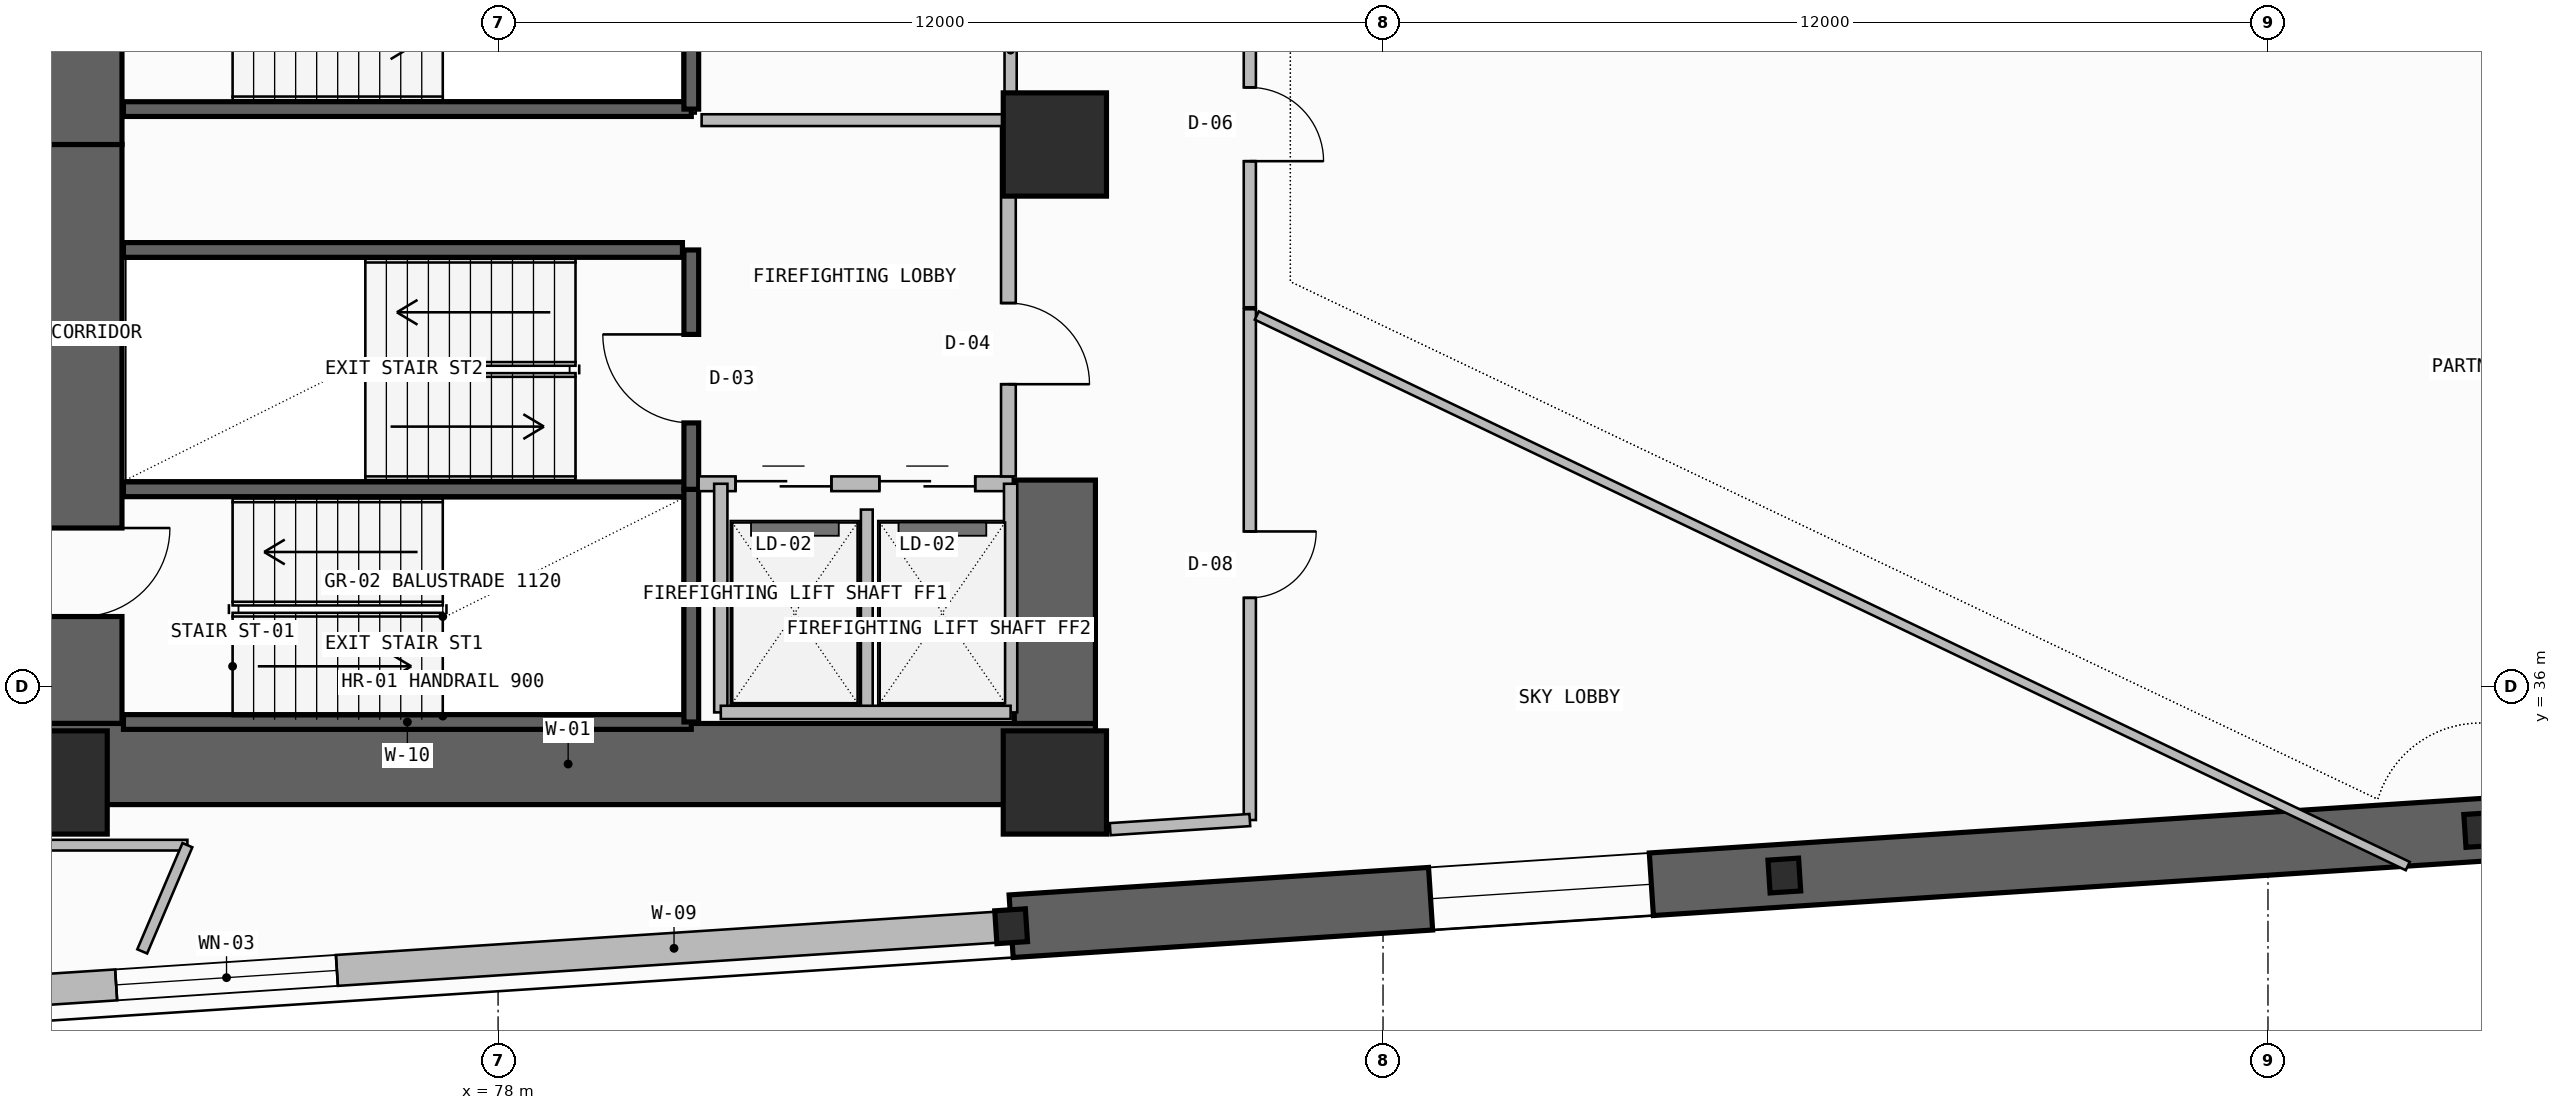
"""IFC4 building model, lengths in metres.
Left out: names, types, materials, properties, quantities, classifications, styles, units other than length and angle.
Written with IfcOpenShell. Run it as: python <this file> out.ifc"""

import sys

from ifc_helpers import new_model, si_unit, direction, frame, frame_2d, origin, origin_2d, place, context, subcontext, project, spatial, rectangle, i_section, extrude, element, fill, save


model = new_model("IFC4")
c1 = context("Model", 3, precision=1e-05, world=origin(), true_north=direction((0.0, 1.0)))
c2 = subcontext(c1, "Body", "Model", "MODEL_VIEW")
j1 = project(units=[si_unit("LENGTHUNIT", "METRE"), si_unit("PLANEANGLEUNIT", "RADIAN")], contexts=[c1])
p1 = place(None, origin())
s1 = spatial("IfcSite", under=j1, at=p1, CompositionType="ELEMENT")
p2 = place(p1, origin())
s2 = spatial("IfcBuilding", under=s1, at=p2, CompositionType="ELEMENT")
p3 = place(p2, frame((0.0, 0.0, 92.1)))
s3 = spatial("IfcBuildingStorey", under=s2, at=p3, CompositionType="ELEMENT", Elevation=92.1)
p4 = place(p3, frame((72.35, 35.5, -0.26), z_axis=(0.0, 0.0, 1.0), x_axis=(0.0, 1.0, 0.0)))
e1 = element("IfcWall", 1, at=p4, inside=s3, PredefinedType="SHEAR", context=c2, shape_type="SweptSolid", body=[
    extrude(rectangle(XDim=7.85, YDim=1.1, at=frame_2d((3.925, 0.0))), origin(), (0.0, 0.0, 1.0), 3.46),
])
p5 = place(p4, frame((1.45, 0.0, 0.26)))
e2 = element("IfcOpeningElement", 2, at=p5, cuts=e1, PredefinedType="OPENING", context=c2, shape_type="SweptSolid", body=[
    extrude(rectangle(XDim=1.2, YDim=2.2, at=frame_2d((0.6, 1.1))), frame((0.0, 0.56, 0.0), z_axis=(0.0, -1.0, 0.0), x_axis=(1.0, 0.0, 0.0)), (0.0, 0.0, 1.0), 1.12),
])
p6 = place(p3, frame((71.8, 34.95, -0.26), z_axis=(0.0, 0.0, 1.0), x_axis=(1.0, 0.0, 0.0)))
e3 = element("IfcWall", 3, at=p6, inside=s3, PredefinedType="SHEAR", context=c2, shape_type="SweptSolid", body=[
    extrude(rectangle(XDim=14.3, YDim=1.1, at=frame_2d((7.15, 0.0))), origin(), (0.0, 0.0, 1.0), 3.46),
])
p7 = place(p3, frame((85.55, 35.5, -0.26), z_axis=(0.0, 0.0, 1.0), x_axis=(0.0, 1.0, 0.0)))
e4 = element("IfcWall", 4, at=p7, inside=s3, PredefinedType="SHEAR", context=c2, shape_type="SweptSolid", body=[
    extrude(rectangle(XDim=3.3, YDim=1.1, at=frame_2d((1.65, 0.0))), origin(), (0.0, 0.0, 1.0), 3.46),
])
p8 = place(p3, frame((72.35, 43.35, -0.26), z_axis=(0.0, 0.0, 1.0), x_axis=(0.0, 1.0, 0.0)))
e5 = element("IfcWall", 5, at=p8, inside=s3, PredefinedType="SHEAR", context=c2, shape_type="SweptSolid", body=[
    extrude(rectangle(XDim=12.7, YDim=1.1, at=frame_2d((6.35, 0.0))), origin(), (0.0, 0.0, 1.0), 3.46),
])
p9 = place(p8, frame((1.35, 0.0, 0.26)))
e6 = element("IfcOpeningElement", 6, at=p9, cuts=e5, PredefinedType="OPENING", context=c2, shape_type="SweptSolid", body=[
    extrude(rectangle(XDim=1.2, YDim=2.2, at=frame_2d((0.6, 1.1))), frame((0.0, 0.56, 0.0), z_axis=(0.0, -1.0, 0.0), x_axis=(1.0, 0.0, 0.0)), (0.0, 0.0, 1.0), 1.12),
])
for number, where, z_axis, x_axis in (
    (7, (72.0, 34.7, 0.0), (0.0, 0.0, 1.0), (1.0, 0.0, 0.0)),
    (8, (85.55, 34.7, 0.0), (0.0, 0.0, 1.0), (1.0, 0.0, 0.0)),
    (9, (85.55, 43.35, 0.0), (0.0, 0.0, 1.0), (1.0, 0.0, 0.0)),
):
    element("IfcColumn", number, at=place(p3, frame(where, z_axis=z_axis, x_axis=x_axis)), inside=s3, PredefinedType="COLUMN", context=c2, shape_type="SweptSolid", body=[
        extrude(rectangle(XDim=1.4, YDim=1.4, at=origin_2d()), origin(), (0.0, 0.0, 1.0), 3.6),
    ])
for number, where, z_axis, x_axis in (
    (10, (84.957, 32.751, 0.0), (0.0, 0.0, 1.0), (0.998, 0.065, 0.0)),
    (11, (95.442, 33.438, 0.0), (0.0, 0.0, 1.0), (0.998, 0.065, 0.0)),
    (12, (104.878, 34.057, 0.0), (0.0, 0.0, 1.0), (0.998, 0.065, 0.0)),
):
    element("IfcColumn", number, at=place(p3, frame(where, z_axis=z_axis, x_axis=x_axis)), inside=s3, PredefinedType="COLUMN", context=c2, shape_type="SweptSolid", body=[
        extrude(i_section(OverallWidth=0.416, OverallDepth=0.446, WebThickness=0.039, FlangeThickness=0.063, FilletRadius=0.015, at=origin_2d()), origin(), (0.0, 0.0, 1.0), 3.6),
    ])
p10 = place(p3, frame((67.133, 31.583, 0.0), z_axis=(0.0, 0.0, 1.0), x_axis=(0.997859040617, 0.065401338356, 0.0)))
e13 = element("IfcWall", 13, at=p10, inside=s3, PredefinedType="SOLIDWALL", context=c2, shape_type="SweptSolid", body=[
    extrude(rectangle(XDim=17.862, YDim=0.42, at=frame_2d((8.931, 0.0))), origin(), (0.0, 0.0, 1.0), 2.177),
])
p11 = place(p10, frame((5.7, 0.0, 1.197)))
e14 = element("IfcOpeningElement", 14, at=p11, cuts=e13, PredefinedType="OPENING", context=c2, shape_type="SweptSolid", body=[
    extrude(rectangle(XDim=3.0, YDim=0.9, at=frame_2d((1.5, 0.45))), frame((0.0, 0.22, 0.0), z_axis=(0.0, -1.0, 0.0), x_axis=(1.0, 0.0, 0.0)), (0.0, 0.0, 1.0), 0.44),
])
p12 = place(p3, frame((84.957, 32.751, -0.26), z_axis=(0.0, 0.0, 1.0), x_axis=(0.997859046449, 0.065401249368, 0.0)))
e15 = element("IfcWall", 15, at=p12, inside=s3, PredefinedType="SHEAR", context=c2, shape_type="SweptSolid", body=[
    extrude(rectangle(XDim=28.4, YDim=0.85, at=frame_2d((14.2, 0.0))), origin(), (0.0, 0.0, 1.0), 3.46),
])
p13 = place(p12, frame((5.7, 0.0, 1.2)))
e16 = element("IfcOpeningElement", 16, at=p13, cuts=e15, PredefinedType="OPENING", context=c2, shape_type="SweptSolid", body=[
    extrude(rectangle(XDim=3.0, YDim=0.9, at=frame_2d((1.5, 0.45))), frame((0.0, 0.435, 0.0), z_axis=(0.0, -1.0, 0.0), x_axis=(1.0, 0.0, 0.0)), (0.0, 0.0, 1.0), 0.87),
])
p14 = place(p3, frame((121.476, 37.781, 0.0), z_axis=(0.0, 0.0, 1.0), x_axis=(-0.787385636484, 0.61646075257, 0.0)))
e17 = element("IfcWall", 17, at=p14, inside=s3, PredefinedType="PARAPET", context=c2, shape_type="SweptSolid", body=[
    extrude(rectangle(XDim=35.957, YDim=0.2, at=frame_2d((17.979, 0.0))), origin(), (0.0, 0.0, 1.0), 1.15),
])
for number, where, z_axis, x_axis in (
    (18, (72.92, 35.52, -0.26), (0.0, 0.0, 1.0), (1.0, 0.0, 0.0)),
    (19, (72.92, 38.675, -0.26), (0.0, 0.0, 1.0), (1.0, 0.0, 0.0)),
):
    element("IfcWall", number, at=place(p3, frame(where, z_axis=z_axis, x_axis=x_axis)), inside=s3, PredefinedType="SOLIDWALL", context=c2, shape_type="SweptSolid", body=[
        extrude(rectangle(XDim=7.7, YDim=0.2, at=frame_2d((3.85, 0.0))), origin(), (0.0, 0.0, 1.0), 3.46),
    ])
p15 = place(p3, frame((80.62, 35.52, -0.26), z_axis=(0.0, 0.0, 1.0), x_axis=(0.0, 1.0, 0.0)))
e20 = element("IfcWall", 20, at=p15, inside=s3, PredefinedType="SOLIDWALL", context=c2, shape_type="SweptSolid", body=[
    extrude(rectangle(XDim=3.155, YDim=0.2, at=frame_2d((1.578, 0.0))), origin(), (0.0, 0.0, 1.0), 3.46),
])
p16 = place(p3, frame((80.62, 38.675, -0.26), z_axis=(0.0, 0.0, 1.0), x_axis=(0.0, 1.0, 0.0)))
e21 = element("IfcWall", 21, at=p16, inside=s3, PredefinedType="SOLIDWALL", context=c2, shape_type="SweptSolid", body=[
    extrude(rectangle(XDim=3.245, YDim=0.2, at=frame_2d((1.623, 0.0))), origin(), (0.0, 0.0, 1.0), 3.46),
])
p17 = place(p16, frame((0.9, 0.0, 0.26)))
e22 = element("IfcOpeningElement", 22, at=p17, cuts=e21, PredefinedType="OPENING", context=c2, shape_type="SweptSolid", body=[
    extrude(rectangle(XDim=1.2, YDim=2.2, at=frame_2d((0.6, 1.1))), frame((0.0, 0.11, 0.0), z_axis=(0.0, -1.0, 0.0), x_axis=(1.0, 0.0, 0.0)), (0.0, 0.0, 1.0), 0.22),
])
p18 = place(p3, frame((80.72, 38.75, 0.0), z_axis=(0.0, 0.0, 1.0), x_axis=(1.0, 0.0, 0.0)))
e23 = element("IfcWall", 23, at=p18, inside=s3, PredefinedType="SOLIDWALL", context=c2, shape_type="SweptSolid", body=[
    extrude(rectangle(XDim=4.26, YDim=0.2, at=frame_2d((2.13, 0.0))), origin(), (0.0, 0.0, 1.0), 3.2),
])
p19 = place(p18, frame((0.5, 0.0, 0.0)))
e24 = element("IfcOpeningElement", 24, at=p19, cuts=e23, PredefinedType="OPENING", context=c2, shape_type="SweptSolid", body=[
    extrude(rectangle(XDim=1.3, YDim=2.3, at=frame_2d((0.65, 1.15))), frame((0.0, 0.11, 0.0), z_axis=(0.0, -1.0, 0.0), x_axis=(1.0, 0.0, 0.0)), (0.0, 0.0, 1.0), 0.22),
])
p20 = place(p18, frame((2.45, 0.0, 0.0)))
e25 = element("IfcOpeningElement", 25, at=p20, cuts=e23, PredefinedType="OPENING", context=c2, shape_type="SweptSolid", body=[
    extrude(rectangle(XDim=1.3, YDim=2.3, at=frame_2d((0.65, 1.15))), frame((0.0, 0.11, 0.0), z_axis=(0.0, -1.0, 0.0), x_axis=(1.0, 0.0, 0.0)), (0.0, 0.0, 1.0), 0.22),
])
p21 = place(p3, frame((83.0, 35.65, 0.0), z_axis=(0.0, 0.0, 1.0), x_axis=(0.0, 1.0, 0.0)))
e26 = element("IfcWall", 26, at=p21, inside=s3, PredefinedType="PLUMBINGWALL", context=c2, shape_type="SweptSolid", body=[
    extrude(rectangle(XDim=2.75, YDim=0.16, at=frame_2d((1.375, 0.0))), origin(), (0.0, 0.0, 1.0), 3.2),
])
for number, where, z_axis, x_axis in (
    (27, (84.95, 35.65, 0.0), (0.0, 0.0, 1.0), (0.0, 1.0, 0.0)),
    (28, (81.02, 35.65, 0.0), (0.0, 0.0, 1.0), (0.0, 1.0, 0.0)),
):
    element("IfcWall", number, at=place(p3, frame(where, z_axis=z_axis, x_axis=x_axis)), inside=s3, PredefinedType="SOLIDWALL", context=c2, shape_type="SweptSolid", body=[
        extrude(rectangle(XDim=3.1, YDim=0.18, at=frame_2d((1.55, 0.0))), origin(), (0.0, 0.0, 1.0), 3.2),
    ])
p22 = place(p3, frame((81.02, 35.65, 0.0), z_axis=(0.0, 0.0, 1.0), x_axis=(1.0, 0.0, 0.0)))
e29 = element("IfcWall", 29, at=p22, inside=s3, PredefinedType="SOLIDWALL", context=c2, shape_type="SweptSolid", body=[
    extrude(rectangle(XDim=3.93, YDim=0.18, at=frame_2d((1.965, 0.0))), origin(), (0.0, 0.0, 1.0), 3.2),
])
p23 = place(p3, frame((84.92, 38.85, 0.0), z_axis=(0.0, 0.0, 1.0), x_axis=(0.0, 1.0, 0.0)))
e30 = element("IfcWall", 30, at=p23, inside=s3, PredefinedType="SOLIDWALL", context=c2, shape_type="SweptSolid", body=[
    extrude(rectangle(XDim=4.83, YDim=0.2, at=frame_2d((2.415, 0.0))), origin(), (0.0, 0.0, 1.0), 3.2),
])
p24 = place(p23, frame((1.25, 0.0, 0.0)))
e31 = element("IfcOpeningElement", 31, at=p24, cuts=e30, PredefinedType="OPENING", context=c2, shape_type="SweptSolid", body=[
    extrude(rectangle(XDim=1.1, YDim=2.2, at=frame_2d((0.55, 1.1))), frame((0.0, 0.11, 0.0), z_axis=(0.0, -1.0, 0.0), x_axis=(1.0, 0.0, 0.0)), (0.0, 0.0, 1.0), 0.22),
])
p25 = place(p3, frame((72.92, 41.92, -0.26), z_axis=(0.0, 0.0, 1.0), x_axis=(1.0, 0.0, 0.0)))
e32 = element("IfcWall", 32, at=p25, inside=s3, PredefinedType="SOLIDWALL", context=c2, shape_type="SweptSolid", body=[
    extrude(rectangle(XDim=7.58, YDim=0.2, at=frame_2d((3.79, 0.0))), origin(), (0.0, 0.0, 1.0), 3.46),
])
p26 = place(p3, frame((72.92, 43.83, -0.26), z_axis=(0.0, 0.0, 1.0), x_axis=(1.0, 0.0, 0.0)))
e33 = element("IfcWall", 33, at=p26, inside=s3, PredefinedType="SOLIDWALL", context=c2, shape_type="SweptSolid", body=[
    extrude(rectangle(XDim=7.7, YDim=0.2, at=frame_2d((3.85, 0.0))), origin(), (0.0, 0.0, 1.0), 3.46),
])
p27 = place(p3, frame((80.62, 43.83, -0.26), z_axis=(0.0, 0.0, 1.0), x_axis=(0.0, 1.0, 0.0)))
e34 = element("IfcWall", 34, at=p27, inside=s3, PredefinedType="SOLIDWALL", context=c2, shape_type="SweptSolid", body=[
    extrude(rectangle(XDim=3.24, YDim=0.2, at=frame_2d((1.62, 0.0))), origin(), (0.0, 0.0, 1.0), 3.46),
])
p28 = place(p3, frame((84.95, 43.68, 0.0), z_axis=(0.0, 0.0, 1.0), x_axis=(0.0, 1.0, 0.0)))
e35 = element("IfcWall", 35, at=p28, inside=s3, PredefinedType="PLUMBINGWALL", context=c2, shape_type="SweptSolid", body=[
    extrude(rectangle(XDim=1.9, YDim=0.165, at=frame_2d((0.95, 0.0))), origin(), (0.0, 0.0, 1.0), 3.2),
])
p29 = place(p3, frame((80.76, 43.68, 0.0), z_axis=(0.0, 0.0, 1.0), x_axis=(1.0, 0.0, 0.0)))
e36 = element("IfcWall", 36, at=p29, inside=s3, PredefinedType="PLUMBINGWALL", context=c2, shape_type="SweptSolid", body=[
    extrude(rectangle(XDim=4.19, YDim=0.16, at=frame_2d((2.095, 0.0))), origin(), (0.0, 0.0, 1.0), 3.2),
])
p30 = place(p3, frame((88.194, 34.191, 0.0), z_axis=(0.0, 0.0, 1.0), x_axis=(0.0, 1.0, 0.0)))
e37 = element("IfcWall", 37, at=p30, inside=s3, PredefinedType="PARTITIONING", context=c2, shape_type="SweptSolid", body=[
    extrude(rectangle(XDim=6.926, YDim=0.165, at=frame_2d((3.463, 0.0))), origin(), (0.0, 0.0, 1.0), 2.177),
])
p31 = place(p30, frame((3.013, 0.0, 0.0)))
e38 = element("IfcOpeningElement", 38, at=p31, cuts=e37, PredefinedType="OPENING", context=c2, shape_type="SweptSolid", body=[
    extrude(rectangle(XDim=0.9, YDim=2.1, at=frame_2d((0.45, 1.05))), frame((0.0, 0.093, 0.0), z_axis=(0.0, -1.0, 0.0), x_axis=(1.0, 0.0, 0.0)), (0.0, 0.0, 1.0), 0.185),
])
p32 = place(p3, frame((86.3, 34.067, 0.0), z_axis=(0.0, 0.0, 1.0), x_axis=(0.997861903793, 0.065357638877, 0.0)))
e39 = element("IfcWall", 39, at=p32, inside=s3, PredefinedType="PARTITIONING", context=c2, shape_type="SweptSolid", body=[
    extrude(rectangle(XDim=1.898, YDim=0.165, at=frame_2d((0.949, 0.0))), origin(), (0.0, 0.0, 1.0), 2.177),
])
p33 = place(p3, frame((88.288, 41.031, 0.0), z_axis=(0.0, 0.0, 1.0), x_axis=(0.90213016178, -0.431463985991, 0.0)))
e40 = element("IfcWall", 40, at=p33, inside=s3, PredefinedType="PARTITIONING", context=c2, shape_type="SweptSolid", body=[
    extrude(rectangle(XDim=17.301, YDim=0.125, at=frame_2d((8.65, 0.0))), origin(), (0.0, 0.0, 1.0), 2.177),
])
p34 = place(p3, frame((88.194, 41.143, 0.0), z_axis=(0.0, 0.0, 1.0), x_axis=(0.0, 1.0, 0.0)))
e41 = element("IfcWall", 41, at=p34, inside=s3, PredefinedType="PARTITIONING", context=c2, shape_type="SweptSolid", body=[
    extrude(rectangle(XDim=4.962, YDim=0.165, at=frame_2d((2.481, 0.0))), origin(), (0.0, 0.0, 1.0), 3.2),
])
p35 = place(p34, frame((1.981, 0.0, 0.0)))
e42 = element("IfcOpeningElement", 42, at=p35, cuts=e41, PredefinedType="OPENING", context=c2, shape_type="SweptSolid", body=[
    extrude(rectangle(XDim=1.0, YDim=2.2, at=frame_2d((0.5, 1.1))), frame((0.0, 0.093, 0.0), z_axis=(0.0, -1.0, 0.0), x_axis=(1.0, 0.0, 0.0)), (0.0, 0.0, 1.0), 0.185),
])
p36 = place(p3, frame((71.482, 33.85, 0.0), z_axis=(0.0, 0.0, 1.0), x_axis=(1.0, 0.0, 0.0)))
e43 = element("IfcWall", 43, at=p36, inside=s3, PredefinedType="PARTITIONING", context=c2, shape_type="SweptSolid", body=[
    extrude(rectangle(XDim=2.305, YDim=0.145, at=frame_2d((1.152, 0.0))), origin(), (0.0, 0.0, 1.0), 3.2),
])
p37 = place(p3, frame((73.787, 33.85, 0.0), z_axis=(0.0, 0.0, 1.0), x_axis=(-0.391602924405, -0.920134310629, 0.0)))
e44 = element("IfcWall", 44, at=p37, inside=s3, PredefinedType="PARTITIONING", context=c2, shape_type="SweptSolid", body=[
    extrude(rectangle(XDim=1.565, YDim=0.145, at=frame_2d((0.783, 0.0))), origin(), (0.0, 0.0, 1.0), 3.2),
])
p38 = place(p11, origin())
e45 = element("IfcWindow", 45, at=p38, inside=s3, PartitioningType="SINGLE_PANEL", PredefinedType="WINDOW", context=c2, shape_type="SweptSolid", body=[
    extrude(rectangle(XDim=3.0, YDim=0.9, at=frame_2d((1.5, 0.45))), frame((0.0, 0.03, 0.0), z_axis=(0.0, -1.0, 0.0), x_axis=(1.0, 0.0, 0.0)), (0.0, 0.0, 1.0), 0.06),
])
fill(e14, e45)
p39 = place(p13, origin())
e46 = element("IfcWindow", 46, at=p39, inside=s3, PartitioningType="SINGLE_PANEL", PredefinedType="WINDOW", context=c2, shape_type="SweptSolid", body=[
    extrude(rectangle(XDim=3.0, YDim=0.9, at=frame_2d((1.5, 0.45))), frame((0.0, 0.03, 0.0), z_axis=(0.0, -1.0, 0.0), x_axis=(1.0, 0.0, 0.0)), (0.0, 0.0, 1.0), 0.06),
])
fill(e16, e46)
p40 = place(p5, frame((1.2, 0.0, 0.0), z_axis=(0.0, 0.0, 1.0), x_axis=(-1.0, 0.0, 0.0)))
e47 = element("IfcDoor", 47, at=p40, inside=s3, OperationType="SINGLE_SWING_LEFT", PredefinedType="USERDEFINED", context=c2, shape_type="SweptSolid", body=[
    extrude(rectangle(XDim=1.2, YDim=2.2, at=frame_2d((0.6, 1.1))), frame((0.0, 0.025, 0.0), z_axis=(0.0, -1.0, 0.0), x_axis=(1.0, 0.0, 0.0)), (0.0, 0.0, 1.0), 0.05),
])
fill(e2, e47)
p41 = place(p17, origin())
e48 = element("IfcDoor", 48, at=p41, inside=s3, OperationType="SINGLE_SWING_RIGHT", PredefinedType="USERDEFINED", context=c2, shape_type="SweptSolid", body=[
    extrude(rectangle(XDim=1.2, YDim=2.2, at=frame_2d((0.6, 1.1))), frame((0.0, 0.025, 0.0), z_axis=(0.0, -1.0, 0.0), x_axis=(1.0, 0.0, 0.0)), (0.0, 0.0, 1.0), 0.05),
])
fill(e22, e48)
p42 = place(p19, origin())
e49 = element("IfcDoor", 49, at=p42, inside=s3, OperationType="DOUBLE_DOOR_SLIDING", PredefinedType="DOOR", context=c2, shape_type="SweptSolid", body=[
    extrude(rectangle(XDim=1.3, YDim=2.3, at=frame_2d((0.65, 1.15))), frame((0.0, 0.025, 0.0), z_axis=(0.0, -1.0, 0.0), x_axis=(1.0, 0.0, 0.0)), (0.0, 0.0, 1.0), 0.05),
])
fill(e24, e49)
p43 = place(p20, origin())
e50 = element("IfcDoor", 50, at=p43, inside=s3, OperationType="DOUBLE_DOOR_SLIDING", PredefinedType="DOOR", context=c2, shape_type="SweptSolid", body=[
    extrude(rectangle(XDim=1.3, YDim=2.3, at=frame_2d((0.65, 1.15))), frame((0.0, 0.025, 0.0), z_axis=(0.0, -1.0, 0.0), x_axis=(1.0, 0.0, 0.0)), (0.0, 0.0, 1.0), 0.05),
])
fill(e25, e50)
p44 = place(p24, frame((1.1, 0.0, 0.0), z_axis=(0.0, 0.0, 1.0), x_axis=(-1.0, 0.0, 0.0)))
e51 = element("IfcDoor", 51, at=p44, inside=s3, OperationType="SINGLE_SWING_RIGHT", PredefinedType="DOOR", context=c2, shape_type="SweptSolid", body=[
    extrude(rectangle(XDim=1.1, YDim=2.2, at=frame_2d((0.55, 1.1))), frame((0.0, 0.025, 0.0), z_axis=(0.0, -1.0, 0.0), x_axis=(1.0, 0.0, 0.0)), (0.0, 0.0, 1.0), 0.05),
])
fill(e31, e51)
p45 = place(p31, frame((0.9, 0.0, 0.0), z_axis=(0.0, 0.0, 1.0), x_axis=(-1.0, 0.0, 0.0)))
e52 = element("IfcDoor", 52, at=p45, inside=s3, OperationType="SINGLE_SWING_LEFT", PredefinedType="DOOR", context=c2, shape_type="SweptSolid", body=[
    extrude(rectangle(XDim=0.9, YDim=2.1, at=frame_2d((0.45, 1.05))), frame((0.0, 0.025, 0.0), z_axis=(0.0, -1.0, 0.0), x_axis=(1.0, 0.0, 0.0)), (0.0, 0.0, 1.0), 0.05),
])
fill(e38, e52)
p46 = place(p35, frame((1.0, 0.0, 0.0), z_axis=(0.0, 0.0, 1.0), x_axis=(-1.0, 0.0, 0.0)))
e53 = element("IfcDoor", 53, at=p46, inside=s3, OperationType="SINGLE_SWING_RIGHT", PredefinedType="DOOR", context=c2, shape_type="SweptSolid", body=[
    extrude(rectangle(XDim=1.0, YDim=2.2, at=frame_2d((0.5, 1.1))), frame((0.0, 0.025, 0.0), z_axis=(0.0, -1.0, 0.0), x_axis=(1.0, 0.0, 0.0)), (0.0, 0.0, 1.0), 0.05),
])
fill(e42, e53)
save(model, sys.argv[1])
